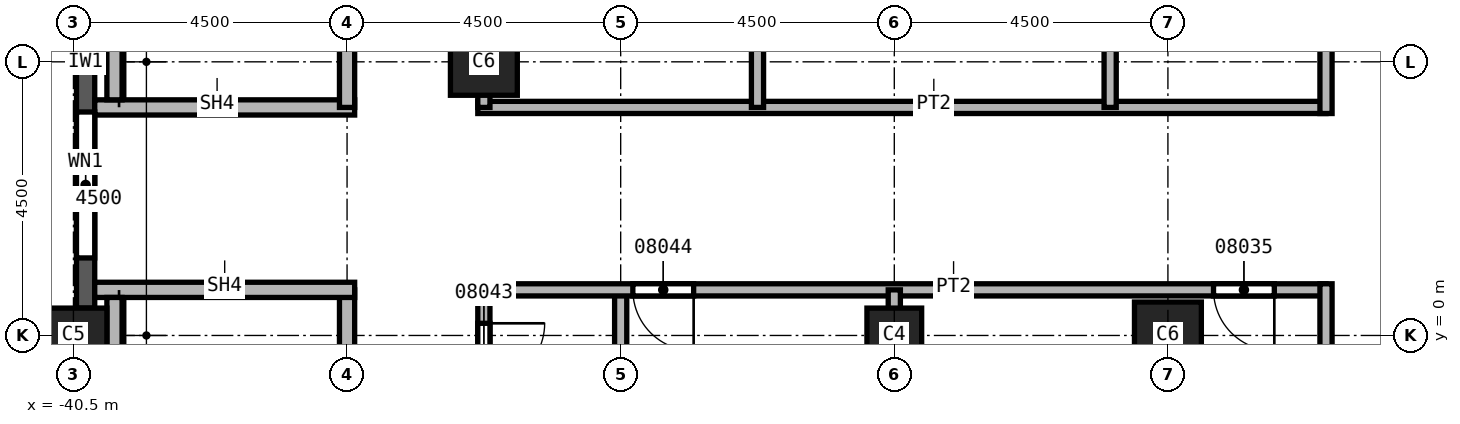
"""IFC4 building model, lengths in metres.
Left out: names, types, materials, properties, quantities, classifications, styles, units other than length and angle.
Written with IfcOpenShell. Run it as: python <this file> out.ifc"""

import sys

from ifc_helpers import new_model, si_unit, direction, frame, frame_2d, origin, origin_2d, place, context, subcontext, project, spatial, rectangle, extrude, element, fill, save


model = new_model("IFC4")
c1 = context("Model", 3, precision=1e-05, world=origin(), true_north=direction((0.0, 1.0)))
c2 = subcontext(c1, "Body", "Model", "MODEL_VIEW")
j1 = project(units=[si_unit("LENGTHUNIT", "METRE"), si_unit("PLANEANGLEUNIT", "RADIAN")], contexts=[c1])
p1 = place(None, origin())
s1 = spatial("IfcSite", under=j1, at=p1, CompositionType="ELEMENT")
p2 = place(p1, origin())
s2 = spatial("IfcBuilding", under=s1, at=p2, CompositionType="ELEMENT")
p3 = place(p2, frame((0.0, 0.0, 150.0)))
s3 = spatial("IfcBuildingStorey", under=s2, at=p3, CompositionType="ELEMENT", Elevation=150.0)
p4 = place(p3, frame((-40.5, 0.0, 0.0), z_axis=(0.0, 0.0, 1.0), x_axis=(0.0, 1.0, 0.0)))
e1 = element("IfcColumn", 1, at=p4, inside=s3, PredefinedType="COLUMN", context=c2, shape_type="SweptSolid", body=[
    extrude(rectangle(XDim=0.9, YDim=1.1, at=origin_2d()), origin(), (0.0, 0.0, 1.0), 3.7),
])
for number, where, z_axis, x_axis in (
    (2, (-33.75, 4.5, 0.0), (0.0, 0.0, 1.0), (1.0, 0.0, 0.0)),
    (3, (-22.5, 0.0, 0.0), (0.0, 0.0, 1.0), (1.0, 0.0, 0.0)),
):
    element("IfcColumn", number, at=place(p3, frame(where, z_axis=z_axis, x_axis=x_axis)), inside=s3, PredefinedType="COLUMN", context=c2, shape_type="SweptSolid", body=[
        extrude(rectangle(XDim=1.1, YDim=1.1, at=origin_2d()), origin(), (0.0, 0.0, 1.0), 3.7),
    ])
p5 = place(p3, frame((-27.0, 0.0, 0.0), z_axis=(0.0, 0.0, 1.0), x_axis=(1.0, 0.0, 0.0)))
e4 = element("IfcColumn", 4, at=p5, inside=s3, PredefinedType="COLUMN", context=c2, shape_type="SweptSolid", body=[
    extrude(rectangle(XDim=0.9, YDim=0.9, at=origin_2d()), origin(), (0.0, 0.0, 1.0), 3.7),
])
p6 = place(p3, frame((-40.3, 8.55, 0.0), z_axis=(0.0, 0.0, 1.0), x_axis=(0.0, -1.0, 0.0)))
e5 = element("IfcWall", 5, at=p6, inside=s3, PredefinedType="SOLIDWALL", context=c2, shape_type="SweptSolid", body=[
    extrude(rectangle(XDim=8.1, YDim=0.3, at=frame_2d((4.05, 0.0))), origin(), (0.0, 0.0, 1.0), 3.1),
])
p7 = place(p6, frame((0.825, 0.0, 0.8)))
e6 = element("IfcOpeningElement", 6, at=p7, cuts=e5, PredefinedType="OPENING", context=c2, shape_type="SweptSolid", body=[
    extrude(rectangle(XDim=2.4, YDim=1.95, at=frame_2d((1.2, 0.975))), frame((0.0, 0.15, 0.0), z_axis=(0.0, -1.0, 0.0), x_axis=(1.0, 0.0, 0.0)), (0.0, 0.0, 1.0), 0.3),
])
p8 = place(p6, frame((4.875, 0.0, 0.8)))
e7 = element("IfcOpeningElement", 7, at=p8, cuts=e5, PredefinedType="OPENING", context=c2, shape_type="SweptSolid", body=[
    extrude(rectangle(XDim=2.4, YDim=1.95, at=frame_2d((1.2, 0.975))), frame((0.0, 0.15, 0.0), z_axis=(0.0, -1.0, 0.0), x_axis=(1.0, 0.0, 0.0)), (0.0, 0.0, 1.0), 0.3),
])
p9 = place(p3, frame((-33.85, 3.75, 0.0), z_axis=(0.0, 0.0, 1.0), x_axis=(1.0, 0.0, 0.0)))
e8 = element("IfcWall", 8, at=p9, inside=s3, PredefinedType="PARTITIONING", context=c2, shape_type="SweptSolid", body=[
    extrude(rectangle(XDim=13.95, YDim=0.2, at=frame_2d((6.975, 0.0))), origin(), (0.0, 0.0, 1.0), 3.7),
])
p10 = place(p3, frame((-33.75, 0.75, 0.0), z_axis=(0.0, 0.0, 1.0), x_axis=(0.0, -1.0, 0.0)))
e9 = element("IfcWall", 9, at=p10, inside=s3, PredefinedType="PARTITIONING", context=c2, shape_type="SweptSolid", body=[
    extrude(rectangle(XDim=7.6, YDim=0.2, at=frame_2d((3.8, 0.0))), origin(), (0.0, 0.0, 1.0), 3.7),
])
p11 = place(p10, frame((0.55, 0.0, 0.0)))
e10 = element("IfcOpeningElement", 10, at=p11, cuts=e9, PredefinedType="OPENING", context=c2, shape_type="SweptSolid", body=[
    extrude(rectangle(XDim=1.0, YDim=2.1, at=frame_2d((0.5, 1.05))), frame((0.0, 0.1, 0.0), z_axis=(0.0, -1.0, 0.0), x_axis=(1.0, 0.0, 0.0)), (0.0, 0.0, 1.0), 0.2),
])
p12 = place(p3, frame((-33.75, 11.25, 0.0), z_axis=(0.0, 0.0, 1.0), x_axis=(0.0, -1.0, 0.0)))
e11 = element("IfcWall", 11, at=p12, inside=s3, PredefinedType="PARTITIONING", context=c2, shape_type="SweptSolid", body=[
    extrude(rectangle(XDim=7.5, YDim=0.2, at=frame_2d((3.75, 0.0))), origin(), (0.0, 0.0, 1.0), 3.7),
])
p13 = place(p12, frame((1.45, 0.0, 0.0)))
e12 = element("IfcOpeningElement", 12, at=p13, cuts=e11, PredefinedType="OPENING", context=c2, shape_type="SweptSolid", body=[
    extrude(rectangle(XDim=1.0, YDim=2.1, at=frame_2d((0.5, 1.05))), frame((0.0, 0.1, 0.0), z_axis=(0.0, -1.0, 0.0), x_axis=(1.0, 0.0, 0.0)), (0.0, 0.0, 1.0), 0.2),
])
p14 = place(p3, frame((-31.5, 0.75, 0.0), z_axis=(0.0, 0.0, 1.0), x_axis=(0.0, -1.0, 0.0)))
e13 = element("IfcWall", 13, at=p14, inside=s3, PredefinedType="PARTITIONING", context=c2, shape_type="SweptSolid", body=[
    extrude(rectangle(XDim=18.2, YDim=0.2, at=frame_2d((9.1, 0.0))), origin(), (0.0, 0.0, 1.0), 3.7),
])
p15 = place(p3, frame((-19.9, 0.75, 0.0), z_axis=(0.0, 0.0, 1.0), x_axis=(-1.0, 0.0, 0.0)))
e14 = element("IfcWall", 14, at=p15, inside=s3, PredefinedType="PARTITIONING", context=c2, shape_type="SweptSolid", body=[
    extrude(rectangle(XDim=13.95, YDim=0.2, at=frame_2d((6.975, 0.0))), origin(), (0.0, 0.0, 1.0), 3.7),
])
p16 = place(p15, frame((0.85, 0.0, 0.0)))
e15 = element("IfcOpeningElement", 15, at=p16, cuts=e14, PredefinedType="OPENING", context=c2, shape_type="SweptSolid", body=[
    extrude(rectangle(XDim=1.0, YDim=2.1, at=frame_2d((0.5, 1.05))), frame((0.0, 0.1, 0.0), z_axis=(0.0, -1.0, 0.0), x_axis=(1.0, 0.0, 0.0)), (0.0, 0.0, 1.0), 0.2),
])
p17 = place(p15, frame((10.4, 0.0, 0.0)))
e16 = element("IfcOpeningElement", 16, at=p17, cuts=e14, PredefinedType="OPENING", context=c2, shape_type="SweptSolid", body=[
    extrude(rectangle(XDim=1.0, YDim=2.1, at=frame_2d((0.5, 1.05))), frame((0.0, 0.1, 0.0), z_axis=(0.0, -1.0, 0.0), x_axis=(1.0, 0.0, 0.0)), (0.0, 0.0, 1.0), 0.2),
])
p18 = place(p3, frame((-29.25, 3.75, 0.0), z_axis=(0.0, 0.0, 1.0), x_axis=(0.0, 1.0, 0.0)))
e17 = element("IfcWall", 17, at=p18, inside=s3, PredefinedType="PARTITIONING", context=c2, shape_type="SweptSolid", body=[
    extrude(rectangle(XDim=13.9, YDim=0.2, at=frame_2d((6.95, 0.0))), origin(), (0.0, 0.0, 1.0), 3.7),
])
p19 = place(p3, frame((-27.0, -17.45, 0.0), z_axis=(0.0, 0.0, 1.0), x_axis=(0.0, 1.0, 0.0)))
e18 = element("IfcWall", 18, at=p19, inside=s3, PredefinedType="PARTITIONING", context=c2, shape_type="SweptSolid", body=[
    extrude(rectangle(XDim=18.2, YDim=0.2, at=frame_2d((9.1, 0.0))), origin(), (0.0, 0.0, 1.0), 3.7),
])
p20 = place(p3, frame((-23.45, 3.75, 0.0), z_axis=(0.0, 0.0, 1.0), x_axis=(0.0, 1.0, 0.0)))
e19 = element("IfcWall", 19, at=p20, inside=s3, PredefinedType="PARTITIONING", context=c2, shape_type="SweptSolid", body=[
    extrude(rectangle(XDim=16.6, YDim=0.2, at=frame_2d((8.3, 0.0))), origin(), (0.0, 0.0, 1.0), 3.7),
])
p21 = place(p20, frame((8.65, 0.0, 0.0)))
e20 = element("IfcOpeningElement", 20, at=p21, cuts=e19, PredefinedType="OPENING", context=c2, shape_type="SweptSolid", body=[
    extrude(rectangle(XDim=1.0, YDim=2.1, at=frame_2d((0.5, 1.05))), frame((0.0, 0.1, 0.0), z_axis=(0.0, -1.0, 0.0), x_axis=(1.0, 0.0, 0.0)), (0.0, 0.0, 1.0), 0.2),
])
p22 = place(p3, frame((-19.9, -23.25, 0.0), z_axis=(0.0, 0.0, 1.0), x_axis=(0.0, 1.0, 0.0)))
e21 = element("IfcWall", 21, at=p22, inside=s3, PredefinedType="PARTITIONING", context=c2, shape_type="SweptSolid", body=[
    extrude(rectangle(XDim=24.1, YDim=0.2, at=frame_2d((12.05, 0.0))), origin(), (0.0, 0.0, 1.0), 3.7),
])
p23 = place(p22, frame((5.5, 0.0, 0.0)))
e22 = element("IfcOpeningElement", 22, at=p23, cuts=e21, PredefinedType="OPENING", context=c2, shape_type="SweptSolid", body=[
    extrude(rectangle(XDim=1.0, YDim=2.1, at=frame_2d((0.5, 1.05))), frame((0.0, 0.1, 0.0), z_axis=(0.0, -1.0, 0.0), x_axis=(1.0, 0.0, 0.0)), (0.0, 0.0, 1.0), 0.2),
])
p24 = place(p22, frame((13.95, 0.0, 0.0)))
e23 = element("IfcOpeningElement", 23, at=p24, cuts=e21, PredefinedType="OPENING", context=c2, shape_type="SweptSolid", body=[
    extrude(rectangle(XDim=1.0, YDim=2.1, at=frame_2d((0.5, 1.05))), frame((0.0, 0.1, 0.0), z_axis=(0.0, -1.0, 0.0), x_axis=(1.0, 0.0, 0.0)), (0.0, 0.0, 1.0), 0.2),
])
p25 = place(p3, frame((-19.9, 3.65, 0.0), z_axis=(0.0, 0.0, 1.0), x_axis=(0.0, 1.0, 0.0)))
e24 = element("IfcWall", 24, at=p25, inside=s3, PredefinedType="PARTITIONING", context=c2, shape_type="SweptSolid", body=[
    extrude(rectangle(XDim=9.95, YDim=0.2, at=frame_2d((4.975, 0.0))), origin(), (0.0, 0.0, 1.0), 3.7),
])
p26 = place(p25, frame((6.25, 0.0, 0.0)))
e25 = element("IfcOpeningElement", 25, at=p26, cuts=e24, PredefinedType="OPENING", context=c2, shape_type="SweptSolid", body=[
    extrude(rectangle(XDim=1.0, YDim=2.1, at=frame_2d((0.5, 1.05))), frame((0.0, 0.1, 0.0), z_axis=(0.0, -1.0, 0.0), x_axis=(1.0, 0.0, 0.0)), (0.0, 0.0, 1.0), 0.2),
])
p27 = place(p3, frame((-40.15, 3.75, 0.0), z_axis=(0.0, 0.0, 1.0), x_axis=(1.0, 0.0, 0.0)))
e26 = element("IfcWall", 26, at=p27, inside=s3, PredefinedType="SOLIDWALL", context=c2, shape_type="SweptSolid", body=[
    extrude(rectangle(XDim=4.275, YDim=0.25, at=frame_2d((2.137, 0.0))), origin(), (0.0, 0.0, 1.0), 3.7),
])
p28 = place(p3, frame((-36.0, 0.75, 0.0), z_axis=(0.0, 0.0, 1.0), x_axis=(0.0, -1.0, 0.0)))
e27 = element("IfcWall", 27, at=p28, inside=s3, PredefinedType="SOLIDWALL", context=c2, shape_type="SweptSolid", body=[
    extrude(rectangle(XDim=7.625, YDim=0.25, at=frame_2d((3.812, 0.0))), origin(), (0.0, 0.0, 1.0), 3.7),
])
p29 = place(p28, frame((5.95, 0.0, 0.0)))
e28 = element("IfcOpeningElement", 28, at=p29, cuts=e27, PredefinedType="OPENING", context=c2, shape_type="SweptSolid", body=[
    extrude(rectangle(XDim=1.2, YDim=2.1, at=frame_2d((0.6, 1.05))), frame((0.0, 0.125, 0.0), z_axis=(0.0, -1.0, 0.0), x_axis=(1.0, 0.0, 0.0)), (0.0, 0.0, 1.0), 0.25),
])
p30 = place(p3, frame((-36.0, 11.375, 0.0), z_axis=(0.0, 0.0, 1.0), x_axis=(0.0, -1.0, 0.0)))
e29 = element("IfcWall", 29, at=p30, inside=s3, PredefinedType="SOLIDWALL", context=c2, shape_type="SweptSolid", body=[
    extrude(rectangle(XDim=7.625, YDim=0.25, at=frame_2d((3.812, 0.0))), origin(), (0.0, 0.0, 1.0), 3.7),
])
p31 = place(p30, frame((0.4, 0.0, 0.0)))
e30 = element("IfcOpeningElement", 30, at=p31, cuts=e29, PredefinedType="OPENING", context=c2, shape_type="SweptSolid", body=[
    extrude(rectangle(XDim=1.2, YDim=2.1, at=frame_2d((0.6, 1.05))), frame((0.0, 0.125, 0.0), z_axis=(0.0, -1.0, 0.0), x_axis=(1.0, 0.0, 0.0)), (0.0, 0.0, 1.0), 0.25),
])
p32 = place(p3, frame((-35.875, 0.75, 0.0), z_axis=(0.0, 0.0, 1.0), x_axis=(-1.0, 0.0, 0.0)))
e31 = element("IfcWall", 31, at=p32, inside=s3, PredefinedType="SOLIDWALL", context=c2, shape_type="SweptSolid", body=[
    extrude(rectangle(XDim=4.275, YDim=0.25, at=frame_2d((2.137, 0.0))), origin(), (0.0, 0.0, 1.0), 3.7),
])
for number, where, z_axis, x_axis in (
    (32, (-39.825, 3.875, 0.0), (0.0, 0.0, 1.0), (0.0, 1.0, 0.0)),
    (33, (-39.825, -6.625, 0.0), (0.0, 0.0, 1.0), (0.0, 1.0, 0.0)),
):
    element("IfcWall", number, at=place(p3, frame(where, z_axis=z_axis, x_axis=x_axis)), inside=s3, PredefinedType="SOLIDWALL", context=c2, shape_type="SweptSolid", body=[
        extrude(rectangle(XDim=7.25, YDim=0.25, at=frame_2d((3.625, 0.0))), origin(), (0.0, 0.0, 1.0), 3.7),
    ])
p33 = place(p8, origin())
e34 = element("IfcWindow", 34, at=p33, inside=s3, PartitioningType="SINGLE_PANEL", PredefinedType="WINDOW", context=c2, shape_type="SweptSolid", body=[
    extrude(rectangle(XDim=2.4, YDim=1.95, at=frame_2d((1.2, 0.975))), frame((0.0, 0.03, 0.0), z_axis=(0.0, -1.0, 0.0), x_axis=(1.0, 0.0, 0.0)), (0.0, 0.0, 1.0), 0.06),
])
fill(e7, e34)
p34 = place(p16, origin())
e35 = element("IfcDoor", 35, at=p34, inside=s3, OperationType="SINGLE_SWING_RIGHT", PredefinedType="DOOR", context=c2, shape_type="SweptSolid", body=[
    extrude(rectangle(XDim=1.0, YDim=2.1, at=frame_2d((0.5, 1.05))), frame((0.0, 0.025, 0.0), z_axis=(0.0, -1.0, 0.0), x_axis=(1.0, 0.0, 0.0)), (0.0, 0.0, 1.0), 0.05),
])
fill(e15, e35)
p35 = place(p11, origin())
e36 = element("IfcDoor", 36, at=p35, inside=s3, OperationType="SINGLE_SWING_RIGHT", PredefinedType="DOOR", context=c2, shape_type="SweptSolid", body=[
    extrude(rectangle(XDim=1.0, YDim=2.1, at=frame_2d((0.5, 1.05))), frame((0.0, 0.025, 0.0), z_axis=(0.0, -1.0, 0.0), x_axis=(1.0, 0.0, 0.0)), (0.0, 0.0, 1.0), 0.05),
])
fill(e10, e36)
p36 = place(p17, origin())
e37 = element("IfcDoor", 37, at=p36, inside=s3, OperationType="SINGLE_SWING_LEFT", PredefinedType="DOOR", context=c2, shape_type="SweptSolid", body=[
    extrude(rectangle(XDim=1.0, YDim=2.1, at=frame_2d((0.5, 1.05))), frame((0.0, 0.025, 0.0), z_axis=(0.0, -1.0, 0.0), x_axis=(1.0, 0.0, 0.0)), (0.0, 0.0, 1.0), 0.05),
])
fill(e16, e37)
save(model, sys.argv[1])
